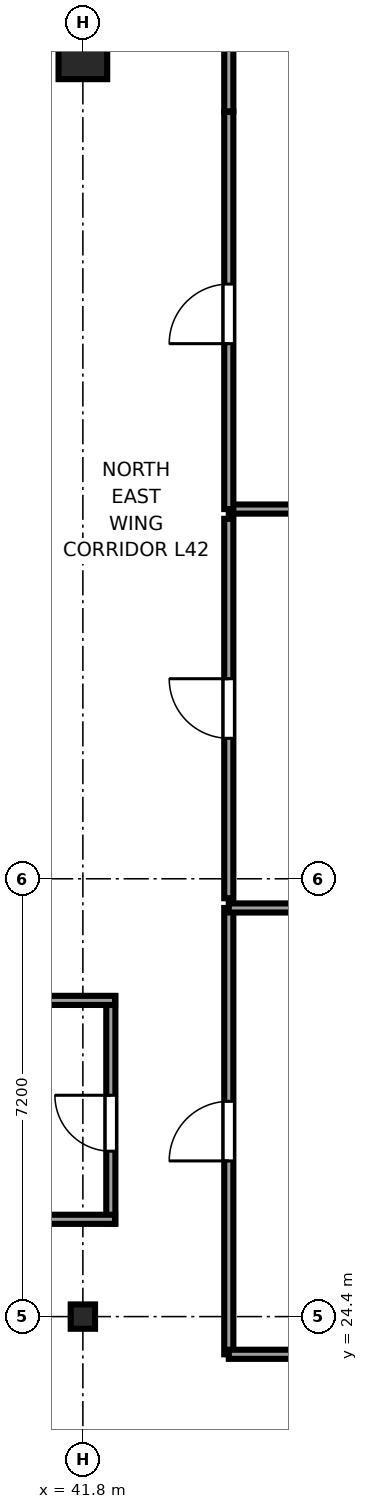
"""IFC4 building model, lengths in metres.
Left out: names, types, materials, properties, quantities, classifications, styles, units other than length and angle.
Written with IfcOpenShell. Run it as: python <this file> out.ifc"""

import sys

from ifc_helpers import new_model, si_unit, direction, frame, frame_2d, origin, origin_2d, place, context, subcontext, project, spatial, rectangle, i_section, extrude, source, transform, mapped, element, fill, save


model = new_model("IFC4")
c1 = context("Model", 3, precision=1e-05, world=origin(), true_north=direction((0.0, 1.0)))
c2 = subcontext(c1, "Body", "Model", "MODEL_VIEW")
j1 = project(units=[si_unit("LENGTHUNIT", "METRE"), si_unit("PLANEANGLEUNIT", "RADIAN")], contexts=[c1])
p1 = place(None, origin())
s1 = spatial("IfcSite", under=j1, at=p1, CompositionType="ELEMENT")
p2 = place(p1, origin())
s2 = spatial("IfcBuilding", under=s1, at=p2, CompositionType="ELEMENT")
p3 = place(p2, frame((0.0, 0.0, 161.25)))
s3 = spatial("IfcBuildingStorey", under=s2, at=p3, CompositionType="ELEMENT", Elevation=161.25)
m1 = source(origin(), c2, "Body", "SweptSolid", [
    extrude(i_section(OverallWidth=0.4, OverallDepth=0.4, WebThickness=0.02, FlangeThickness=0.035, at=origin_2d()), origin(), (0.0, 0.0, 1.0), 3.55),
])
p4 = place(p3, frame((41.8, 24.4, 0.0), z_axis=(0.0, 0.0, 1.0), x_axis=(1.0, 0.0, 0.0)))
e1 = element("IfcColumn", 1, at=p4, inside=s3, PredefinedType="COLUMN", context=c2, shape_type="MappedRepresentation", body=[
    mapped(m1, transform((0.0, 0.0, 0.0), x_axis=(1.0, 0.0, 0.0), y_axis=(0.0, 1.0, 0.0), z_axis=(0.0, 0.0, 1.0), scale=1.0)),
])
m2 = source(origin(), c2, "Body", "SweptSolid", [
    extrude(rectangle(XDim=0.8, YDim=0.8, at=origin_2d()), origin(), (0.0, 0.0, 1.0), 3.55),
])
p5 = place(p3, frame((41.8, 45.15, 0.0), z_axis=(0.0, 0.0, 1.0), x_axis=(1.0, 0.0, 0.0)))
e2 = element("IfcColumn", 2, at=p5, inside=s3, PredefinedType="COLUMN", context=c2, shape_type="MappedRepresentation", body=[
    mapped(m2, transform((0.0, 0.0, 0.0), x_axis=(1.0, 0.0, 0.0), y_axis=(0.0, 1.0, 0.0), z_axis=(0.0, 0.0, 1.0), scale=1.0)),
])
p6 = place(p3, frame((44.2, 37.68, 0.0), z_axis=(0.0, 0.0, 1.0), x_axis=(1.0, 0.0, 0.0)))
e3 = element("IfcWall", 3, at=p6, inside=s3, PredefinedType="PARTITIONING", context=c2, shape_type="SweptSolid", body=[
    extrude(rectangle(XDim=9.795, YDim=0.15, at=frame_2d((4.897, 0.0))), origin(), (0.0, 0.0, 1.0), 3.37),
])
p7 = place(p3, frame((44.2, 23.78, 0.0), z_axis=(0.0, 0.0, 1.0), x_axis=(0.0, 1.0, 0.0)))
e4 = element("IfcWall", 4, at=p7, inside=s3, PredefinedType="PARTITIONING", context=c2, shape_type="SweptSolid", body=[
    extrude(rectangle(XDim=7.34, YDim=0.15, at=frame_2d((3.67, 0.0))), origin(), (0.0, 0.0, 1.0), 3.37),
])
p8 = place(p7, frame((3.18, 0.0, 0.0)))
e5 = element("IfcOpeningElement", 5, at=p8, cuts=e4, PredefinedType="OPENING", context=c2, shape_type="SweptSolid", body=[
    extrude(rectangle(XDim=0.98, YDim=2.12, at=frame_2d((0.49, 1.06))), frame((0.0, 0.085, 0.0), z_axis=(0.0, -1.0, 0.0), x_axis=(1.0, 0.0, 0.0)), (0.0, 0.0, 1.0), 0.17),
])
p9 = place(p3, frame((44.2, 23.78, 0.0), z_axis=(0.0, 0.0, 1.0), x_axis=(1.0, 0.0, 0.0)))
e6 = element("IfcWall", 6, at=p9, inside=s3, PredefinedType="PARTITIONING", context=c2, shape_type="SweptSolid", body=[
    extrude(rectangle(XDim=9.795, YDim=0.15, at=frame_2d((4.897, 0.0))), origin(), (0.0, 0.0, 1.0), 3.37),
])
p10 = place(p3, frame((44.2, 31.12, 0.0), z_axis=(0.0, 0.0, 1.0), x_axis=(1.0, 0.0, 0.0)))
e7 = element("IfcWall", 7, at=p10, inside=s3, PredefinedType="PARTITIONING", context=c2, shape_type="SweptSolid", body=[
    extrude(rectangle(XDim=7.43, YDim=0.15, at=frame_2d((3.715, 0.0))), origin(), (0.0, 0.0, 1.0), 3.37),
])
p11 = place(p3, frame((44.2, 31.28, 0.0), z_axis=(0.0, 0.0, 1.0), x_axis=(0.0, 1.0, 0.0)))
e8 = element("IfcWall", 8, at=p11, inside=s3, PredefinedType="PARTITIONING", context=c2, shape_type="SweptSolid", body=[
    extrude(rectangle(XDim=6.24, YDim=0.15, at=frame_2d((3.12, 0.0))), origin(), (0.0, 0.0, 1.0), 3.37),
])
p12 = place(p11, frame((2.63, 0.0, 0.0)))
e9 = element("IfcOpeningElement", 9, at=p12, cuts=e8, PredefinedType="OPENING", context=c2, shape_type="SweptSolid", body=[
    extrude(rectangle(XDim=0.98, YDim=2.12, at=frame_2d((0.49, 1.06))), frame((0.0, 0.085, 0.0), z_axis=(0.0, -1.0, 0.0), x_axis=(1.0, 0.0, 0.0)), (0.0, 0.0, 1.0), 0.17),
])
p13 = place(p3, frame((44.2, 37.68, 0.0), z_axis=(0.0, 0.0, 1.0), x_axis=(0.0, 1.0, 0.0)))
e10 = element("IfcWall", 10, at=p13, inside=s3, PredefinedType="PARTITIONING", context=c2, shape_type="SweptSolid", body=[
    extrude(rectangle(XDim=6.53, YDim=0.15, at=frame_2d((3.265, 0.0))), origin(), (0.0, 0.0, 1.0), 3.37),
])
p14 = place(p13, frame((2.72, 0.0, 0.0)))
e11 = element("IfcOpeningElement", 11, at=p14, cuts=e10, PredefinedType="OPENING", context=c2, shape_type="SweptSolid", body=[
    extrude(rectangle(XDim=0.98, YDim=2.12, at=frame_2d((0.49, 1.06))), frame((0.0, 0.085, 0.0), z_axis=(0.0, -1.0, 0.0), x_axis=(1.0, 0.0, 0.0)), (0.0, 0.0, 1.0), 0.17),
])
p15 = place(p3, frame((44.2, 44.22, 0.0), z_axis=(0.0, 0.0, 1.0), x_axis=(0.0, 1.0, 0.0)))
e12 = element("IfcWall", 12, at=p15, inside=s3, PredefinedType="PARTITIONING", context=c2, shape_type="SweptSolid", body=[
    extrude(rectangle(XDim=1.375, YDim=0.15, at=frame_2d((0.688, 0.0))), origin(), (0.0, 0.0, 1.0), 3.37),
])
p16 = place(p3, frame((42.26, 25.93, 0.0), z_axis=(0.0, 0.0, 1.0), x_axis=(0.0, 1.0, 0.0)))
e13 = element("IfcWall", 13, at=p16, inside=s3, PredefinedType="PARTITIONING", context=c2, shape_type="SweptSolid", body=[
    extrude(rectangle(XDim=3.74, YDim=0.15, at=frame_2d((1.87, 0.0))), origin(), (0.0, 0.0, 1.0), 3.37),
])
p17 = place(p16, frame((1.19, 0.0, 0.0)))
e14 = element("IfcOpeningElement", 14, at=p17, cuts=e13, PredefinedType="OPENING", context=c2, shape_type="SweptSolid", body=[
    extrude(rectangle(XDim=0.92, YDim=2.01, at=frame_2d((0.46, 1.005))), frame((0.0, 0.085, 0.0), z_axis=(0.0, -1.0, 0.0), x_axis=(1.0, 0.0, 0.0)), (0.0, 0.0, 1.0), 0.17),
])
for number, where, z_axis, x_axis in (
    (15, (37.93, 26.0, 0.0), (0.0, 0.0, 1.0), (1.0, 0.0, 0.0)),
    (16, (37.93, 29.6, 0.0), (0.0, 0.0, 1.0), (1.0, 0.0, 0.0)),
):
    element("IfcWall", number, at=place(p3, frame(where, z_axis=z_axis, x_axis=x_axis)), inside=s3, PredefinedType="PARTITIONING", context=c2, shape_type="SweptSolid", body=[
        extrude(rectangle(XDim=4.4, YDim=0.15, at=frame_2d((2.2, 0.0))), origin(), (0.0, 0.0, 1.0), 3.37),
    ])
m3 = source(origin(), c2, "Body", "SweptSolid", [
    extrude(rectangle(XDim=0.98, YDim=2.12, at=frame_2d((0.49, 1.06))), frame((0.0, 0.025, 0.0), z_axis=(0.0, -1.0, 0.0), x_axis=(1.0, 0.0, 0.0)), (0.0, 0.0, 1.0), 0.05),
])
p18 = place(p8, origin())
e17 = element("IfcDoor", 17, at=p18, inside=s3, OperationType="SINGLE_SWING_LEFT", PredefinedType="DOOR", context=c2, shape_type="MappedRepresentation", body=[
    mapped(m3, transform((0.0, 0.0, 0.0), x_axis=(1.0, 0.0, 0.0), y_axis=(0.0, 1.0, 0.0), z_axis=(0.0, 0.0, 1.0), scale=1.0)),
])
fill(e5, e17)
p19 = place(p12, origin())
e18 = element("IfcDoor", 18, at=p19, inside=s3, OperationType="SINGLE_SWING_RIGHT", PredefinedType="DOOR", context=c2, shape_type="MappedRepresentation", body=[
    mapped(m3, transform((0.0, 0.0, 0.0), x_axis=(1.0, 0.0, 0.0), y_axis=(0.0, 1.0, 0.0), z_axis=(0.0, 0.0, 1.0), scale=1.0)),
])
fill(e9, e18)
p20 = place(p14, origin())
e19 = element("IfcDoor", 19, at=p20, inside=s3, OperationType="SINGLE_SWING_LEFT", PredefinedType="DOOR", context=c2, shape_type="MappedRepresentation", body=[
    mapped(m3, transform((0.0, 0.0, 0.0), x_axis=(1.0, 0.0, 0.0), y_axis=(0.0, 1.0, 0.0), z_axis=(0.0, 0.0, 1.0), scale=1.0)),
])
fill(e11, e19)
m4 = source(origin(), c2, "Body", "SweptSolid", [
    extrude(rectangle(XDim=0.92, YDim=2.01, at=frame_2d((0.46, 1.005))), frame((0.0, 0.025, 0.0), z_axis=(0.0, -1.0, 0.0), x_axis=(1.0, 0.0, 0.0)), (0.0, 0.0, 1.0), 0.05),
])
p21 = place(p17, origin())
e20 = element("IfcDoor", 20, at=p21, inside=s3, OperationType="SINGLE_SWING_RIGHT", PredefinedType="DOOR", context=c2, shape_type="MappedRepresentation", body=[
    mapped(m4, transform((0.0, 0.0, 0.0), x_axis=(1.0, 0.0, 0.0), y_axis=(0.0, 1.0, 0.0), z_axis=(0.0, 0.0, 1.0), scale=1.0)),
])
fill(e14, e20)
save(model, sys.argv[1])
